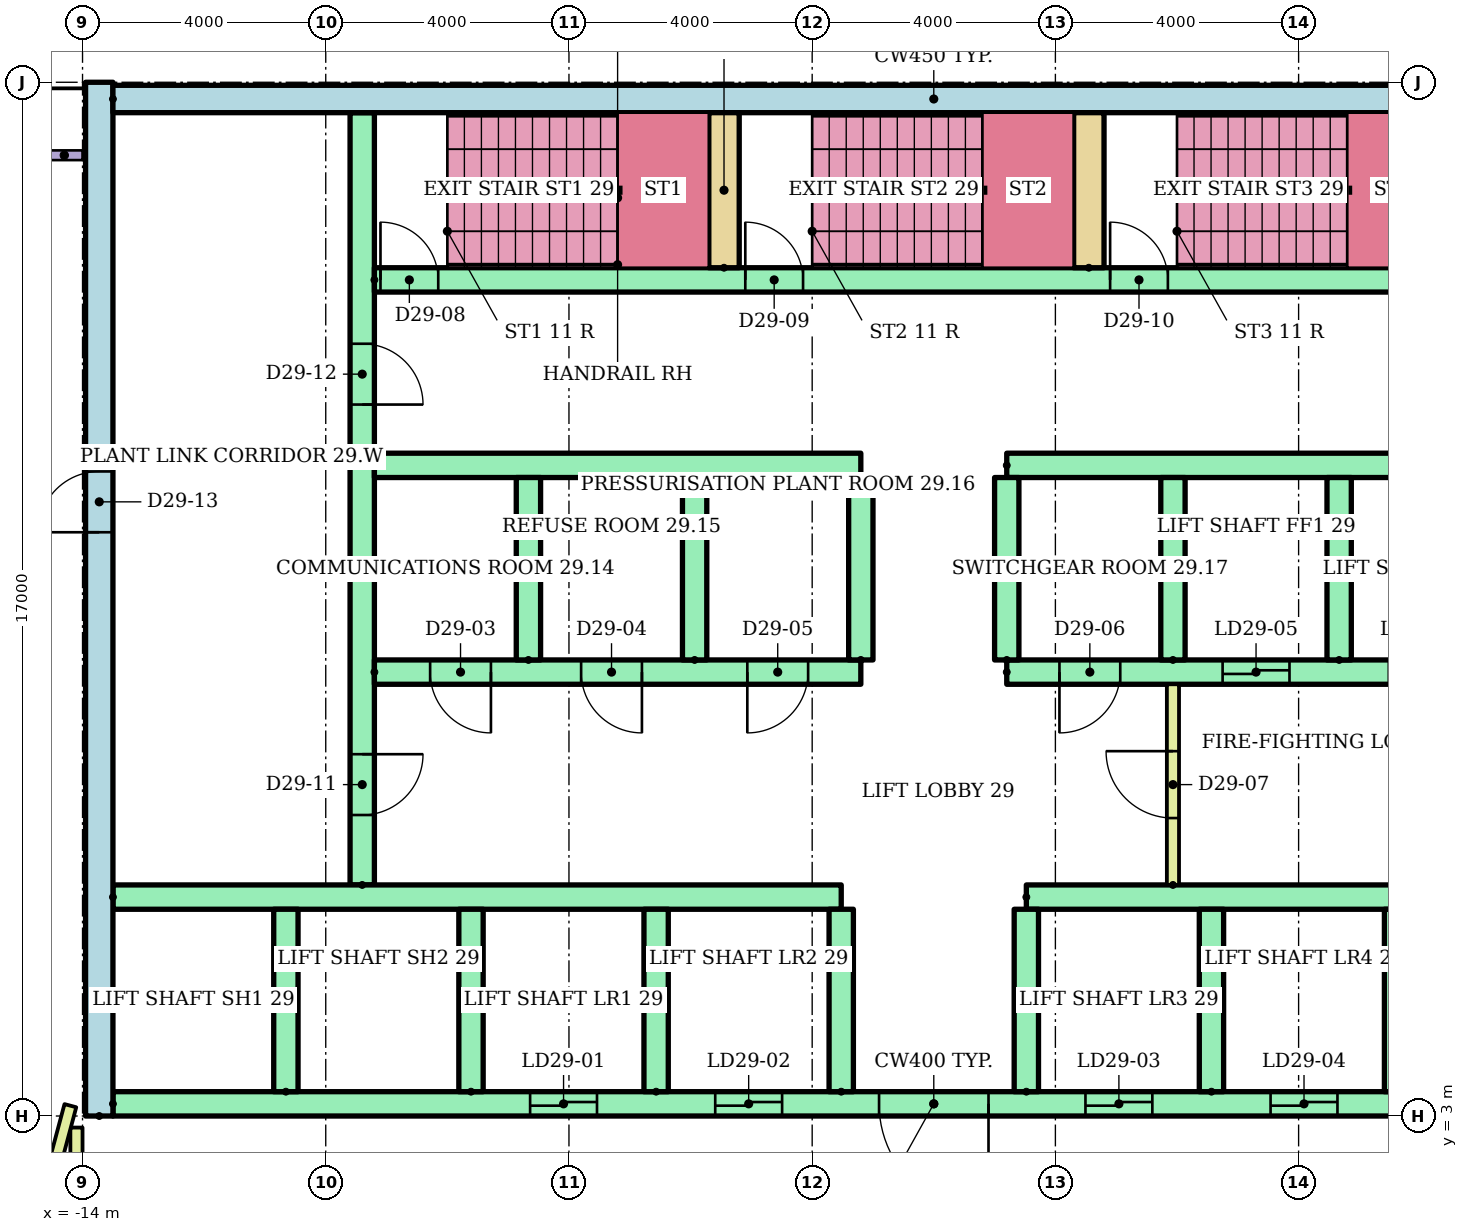
"""IFC4 building model, lengths in metres.
Left out: names, types, materials, properties, quantities, classifications, styles, units other than length and angle.
Written with IfcOpenShell. Run it as: python <this file> out.ifc"""

import sys

from ifc_helpers import new_model, si_unit, direction, frame, frame_2d, origin, place, context, subcontext, project, spatial, rectangle, extrude, element, fill, save


model = new_model("IFC4")
c1 = context("Model", 3, precision=1e-05, world=origin(), true_north=direction((0.0, 1.0)))
c2 = subcontext(c1, "Body", "Model", "MODEL_VIEW")
j1 = project(units=[si_unit("LENGTHUNIT", "METRE"), si_unit("PLANEANGLEUNIT", "RADIAN")], contexts=[c1])
p1 = place(None, origin())
s1 = spatial("IfcSite", under=j1, at=p1, CompositionType="ELEMENT")
p2 = place(p1, origin())
s2 = spatial("IfcBuilding", under=s1, at=p2, CompositionType="ELEMENT")
p3 = place(p2, frame((0.0, 0.0, 115.9)))
s3 = spatial("IfcBuildingStorey", under=s2, at=p3, CompositionType="ELEMENT", Elevation=115.9)
p4 = place(p3, frame((-13.725, 3.0, 0.0), z_axis=(0.0, 0.0, 1.0), x_axis=(0.0, 1.0, 0.0)))
e1 = element("IfcWall", 1, at=p4, inside=s3, PredefinedType="SHEAR", context=c2, shape_type="SweptSolid", body=[
    extrude(rectangle(XDim=17.0, YDim=0.45, at=frame_2d((8.5, 0.0))), origin(), (0.0, 0.0, 1.0), 3.62),
])
p5 = place(p4, frame((9.6, 0.0, 0.0)))
e2 = element("IfcOpeningElement", 2, at=p5, cuts=e1, PredefinedType="OPENING", context=c2, shape_type="SweptSolid", body=[
    extrude(rectangle(XDim=1.0, YDim=2.1, at=frame_2d((0.5, 1.05))), frame((0.0, 0.235, 0.0), z_axis=(0.0, -1.0, 0.0), x_axis=(1.0, 0.0, 0.0)), (0.0, 0.0, 1.0), 0.47),
])
p6 = place(p3, frame((-13.5, 19.725, 0.0)))
e3 = element("IfcWall", 3, at=p6, inside=s3, PredefinedType="SHEAR", context=c2, shape_type="SweptSolid", body=[
    extrude(rectangle(XDim=27.0, YDim=0.45, at=frame_2d((13.5, 0.0))), origin(), (0.0, 0.0, 1.0), 3.62),
])
p7 = place(p3, frame((-9.4, 6.8, 0.0), z_axis=(0.0, 0.0, 1.0), x_axis=(0.0, 1.0, 0.0)))
e4 = element("IfcWall", 4, at=p7, inside=s3, PredefinedType="SHEAR", context=c2, shape_type="SweptSolid", body=[
    extrude(rectangle(XDim=12.7, YDim=0.4, at=frame_2d((6.35, 0.0))), origin(), (0.0, 0.0, 1.0), 3.62),
])
p8 = place(p7, frame((1.15, 0.0, 0.0)))
e5 = element("IfcOpeningElement", 5, at=p8, cuts=e4, PredefinedType="OPENING", context=c2, shape_type="SweptSolid", body=[
    extrude(rectangle(XDim=1.0, YDim=2.1, at=frame_2d((0.5, 1.05))), frame((0.0, 0.21, 0.0), z_axis=(0.0, -1.0, 0.0), x_axis=(1.0, 0.0, 0.0)), (0.0, 0.0, 1.0), 0.42),
])
p9 = place(p7, frame((7.9, 0.0, 0.0)))
e6 = element("IfcOpeningElement", 6, at=p9, cuts=e4, PredefinedType="OPENING", context=c2, shape_type="SweptSolid", body=[
    extrude(rectangle(XDim=1.0, YDim=2.1, at=frame_2d((0.5, 1.05))), frame((0.0, 0.21, 0.0), z_axis=(0.0, -1.0, 0.0), x_axis=(1.0, 0.0, 0.0)), (0.0, 0.0, 1.0), 0.42),
])
p10 = place(p3, frame((-13.5, 3.2, 0.0)))
e7 = element("IfcWall", 7, at=p10, inside=s3, PredefinedType="SHEAR", context=c2, shape_type="SweptSolid", body=[
    extrude(rectangle(XDim=27.0, YDim=0.4, at=frame_2d((13.5, 0.0))), origin(), (0.0, 0.0, 1.0), 3.62),
])
p11 = place(p10, frame((6.861, 0.0, 0.0)))
e8 = element("IfcOpeningElement", 8, at=p11, cuts=e7, PredefinedType="OPENING", context=c2, shape_type="SweptSolid", body=[
    extrude(rectangle(XDim=1.1, YDim=2.1, at=frame_2d((0.55, 1.05))), frame((0.0, 0.21, 0.0), z_axis=(0.0, -1.0, 0.0), x_axis=(1.0, 0.0, 0.0)), (0.0, 0.0, 1.0), 0.42),
])
p12 = place(p10, frame((9.906, 0.0, 0.0)))
e9 = element("IfcOpeningElement", 9, at=p12, cuts=e7, PredefinedType="OPENING", context=c2, shape_type="SweptSolid", body=[
    extrude(rectangle(XDim=1.1, YDim=2.1, at=frame_2d((0.55, 1.05))), frame((0.0, 0.21, 0.0), z_axis=(0.0, -1.0, 0.0), x_axis=(1.0, 0.0, 0.0)), (0.0, 0.0, 1.0), 0.42),
])
p13 = place(p10, frame((15.994, 0.0, 0.0)))
e10 = element("IfcOpeningElement", 10, at=p13, cuts=e7, PredefinedType="OPENING", context=c2, shape_type="SweptSolid", body=[
    extrude(rectangle(XDim=1.1, YDim=2.1, at=frame_2d((0.55, 1.05))), frame((0.0, 0.21, 0.0), z_axis=(0.0, -1.0, 0.0), x_axis=(1.0, 0.0, 0.0)), (0.0, 0.0, 1.0), 0.42),
])
p14 = place(p10, frame((19.039, 0.0, 0.0)))
e11 = element("IfcOpeningElement", 11, at=p14, cuts=e7, PredefinedType="OPENING", context=c2, shape_type="SweptSolid", body=[
    extrude(rectangle(XDim=1.1, YDim=2.1, at=frame_2d((0.55, 1.05))), frame((0.0, 0.21, 0.0), z_axis=(0.0, -1.0, 0.0), x_axis=(1.0, 0.0, 0.0)), (0.0, 0.0, 1.0), 0.42),
])
p15 = place(p10, frame((12.6, 0.0, 0.0)))
e12 = element("IfcOpeningElement", 12, at=p15, cuts=e7, PredefinedType="OPENING", context=c2, shape_type="SweptSolid", body=[
    extrude(rectangle(XDim=1.8, YDim=2.1, at=frame_2d((0.9, 1.05))), frame((0.0, 0.21, 0.0), z_axis=(0.0, -1.0, 0.0), x_axis=(1.0, 0.0, 0.0)), (0.0, 0.0, 1.0), 0.42),
])
p16 = place(p3, frame((-13.5, 6.6, 0.0)))
e13 = element("IfcWall", 13, at=p16, inside=s3, PredefinedType="SHEAR", context=c2, shape_type="SweptSolid", body=[
    extrude(rectangle(XDim=11.978, YDim=0.4, at=frame_2d((5.989, 0.0))), origin(), (0.0, 0.0, 1.0), 3.62),
])
p17 = place(p3, frame((1.522, 6.6, 0.0)))
e14 = element("IfcWall", 14, at=p17, inside=s3, PredefinedType="SHEAR", context=c2, shape_type="SweptSolid", body=[
    extrude(rectangle(XDim=8.078, YDim=0.4, at=frame_2d((4.039, 0.0))), origin(), (0.0, 0.0, 1.0), 3.62),
])
for number, where, z_axis, x_axis in (
    (15, (-10.656, 3.4, 0.0), (0.0, 0.0, 1.0), (0.0, 1.0, 0.0)),
    (16, (-7.611, 3.4, 0.0), (0.0, 0.0, 1.0), (0.0, 1.0, 0.0)),
    (17, (-4.567, 3.4, 0.0), (0.0, 0.0, 1.0), (0.0, 1.0, 0.0)),
    (18, (-1.522, 3.4, 0.0), (0.0, 0.0, 1.0), (0.0, 1.0, 0.0)),
    (19, (1.522, 3.4, 0.0), (0.0, 0.0, 1.0), (0.0, 1.0, 0.0)),
    (20, (4.567, 3.4, 0.0), (0.0, 0.0, 1.0), (0.0, 1.0, 0.0)),
    (21, (7.611, 3.4, 0.0), (0.0, 0.0, 1.0), (0.0, 1.0, 0.0)),
):
    element("IfcWall", number, at=place(p3, frame(where, z_axis=z_axis, x_axis=x_axis)), inside=s3, PredefinedType="SHEAR", context=c2, shape_type="SweptSolid", body=[
        extrude(rectangle(XDim=3.0, YDim=0.4, at=frame_2d((1.5, 0.0))), origin(), (0.0, 0.0, 1.0), 3.62),
    ])
p18 = place(p3, frame((-9.2, 10.3, 0.0)))
e22 = element("IfcWall", 22, at=p18, inside=s3, PredefinedType="SHEAR", context=c2, shape_type="SweptSolid", body=[
    extrude(rectangle(XDim=8.0, YDim=0.4, at=frame_2d((4.0, 0.0))), origin(), (0.0, 0.0, 1.0), 3.62),
])
p19 = place(p18, frame((0.917, 0.0, 0.0)))
e23 = element("IfcOpeningElement", 23, at=p19, cuts=e22, PredefinedType="OPENING", context=c2, shape_type="SweptSolid", body=[
    extrude(rectangle(XDim=1.0, YDim=2.1, at=frame_2d((0.5, 1.05))), frame((0.0, 0.21, 0.0), z_axis=(0.0, -1.0, 0.0), x_axis=(1.0, 0.0, 0.0)), (0.0, 0.0, 1.0), 0.42),
])
p20 = place(p18, frame((3.4, 0.0, 0.0)))
e24 = element("IfcOpeningElement", 24, at=p20, cuts=e22, PredefinedType="OPENING", context=c2, shape_type="SweptSolid", body=[
    extrude(rectangle(XDim=1.0, YDim=2.1, at=frame_2d((0.5, 1.05))), frame((0.0, 0.21, 0.0), z_axis=(0.0, -1.0, 0.0), x_axis=(1.0, 0.0, 0.0)), (0.0, 0.0, 1.0), 0.42),
])
p21 = place(p18, frame((6.133, 0.0, 0.0)))
e25 = element("IfcOpeningElement", 25, at=p21, cuts=e22, PredefinedType="OPENING", context=c2, shape_type="SweptSolid", body=[
    extrude(rectangle(XDim=1.0, YDim=2.1, at=frame_2d((0.5, 1.05))), frame((0.0, 0.21, 0.0), z_axis=(0.0, -1.0, 0.0), x_axis=(1.0, 0.0, 0.0)), (0.0, 0.0, 1.0), 0.42),
])
p22 = place(p3, frame((-9.2, 13.7, 0.0)))
e26 = element("IfcWall", 26, at=p22, inside=s3, PredefinedType="SHEAR", context=c2, shape_type="SweptSolid", body=[
    extrude(rectangle(XDim=8.0, YDim=0.4, at=frame_2d((4.0, 0.0))), origin(), (0.0, 0.0, 1.0), 3.62),
])
p23 = place(p3, frame((1.2, 10.3, 0.0)))
e27 = element("IfcWall", 27, at=p23, inside=s3, PredefinedType="SHEAR", context=c2, shape_type="SweptSolid", body=[
    extrude(rectangle(XDim=8.0, YDim=0.4, at=frame_2d((4.0, 0.0))), origin(), (0.0, 0.0, 1.0), 3.62),
])
p24 = place(p23, frame((3.55, 0.0, 0.0)))
e28 = element("IfcOpeningElement", 28, at=p24, cuts=e27, PredefinedType="OPENING", context=c2, shape_type="SweptSolid", body=[
    extrude(rectangle(XDim=1.1, YDim=2.1, at=frame_2d((0.55, 1.05))), frame((0.0, 0.21, 0.0), z_axis=(0.0, -1.0, 0.0), x_axis=(1.0, 0.0, 0.0)), (0.0, 0.0, 1.0), 0.42),
])
p25 = place(p23, frame((6.283, 0.0, 0.0)))
e29 = element("IfcOpeningElement", 29, at=p25, cuts=e27, PredefinedType="OPENING", context=c2, shape_type="SweptSolid", body=[
    extrude(rectangle(XDim=1.1, YDim=2.1, at=frame_2d((0.55, 1.05))), frame((0.0, 0.21, 0.0), z_axis=(0.0, -1.0, 0.0), x_axis=(1.0, 0.0, 0.0)), (0.0, 0.0, 1.0), 0.42),
])
p26 = place(p23, frame((0.867, 0.0, 0.0)))
e30 = element("IfcOpeningElement", 30, at=p26, cuts=e27, PredefinedType="OPENING", context=c2, shape_type="SweptSolid", body=[
    extrude(rectangle(XDim=1.0, YDim=2.1, at=frame_2d((0.5, 1.05))), frame((0.0, 0.21, 0.0), z_axis=(0.0, -1.0, 0.0), x_axis=(1.0, 0.0, 0.0)), (0.0, 0.0, 1.0), 0.42),
])
p27 = place(p3, frame((1.2, 13.7, 0.0)))
e31 = element("IfcWall", 31, at=p27, inside=s3, PredefinedType="SHEAR", context=c2, shape_type="SweptSolid", body=[
    extrude(rectangle(XDim=8.0, YDim=0.4, at=frame_2d((4.0, 0.0))), origin(), (0.0, 0.0, 1.0), 3.62),
])
for number, where, z_axis, x_axis in (
    (32, (-6.667, 10.5, 0.0), (0.0, 0.0, 1.0), (0.0, 1.0, 0.0)),
    (33, (-3.933, 10.5, 0.0), (0.0, 0.0, 1.0), (0.0, 1.0, 0.0)),
    (34, (-1.2, 10.5, 0.0), (0.0, 0.0, 1.0), (0.0, 1.0, 0.0)),
    (35, (1.2, 10.5, 0.0), (0.0, 0.0, 1.0), (0.0, 1.0, 0.0)),
    (36, (3.933, 10.5, 0.0), (0.0, 0.0, 1.0), (0.0, 1.0, 0.0)),
    (37, (6.667, 10.5, 0.0), (0.0, 0.0, 1.0), (0.0, 1.0, 0.0)),
):
    element("IfcWall", number, at=place(p3, frame(where, z_axis=z_axis, x_axis=x_axis)), inside=s3, PredefinedType="SHEAR", context=c2, shape_type="SweptSolid", body=[
        extrude(rectangle(XDim=3.0, YDim=0.4, at=frame_2d((1.5, 0.0))), origin(), (0.0, 0.0, 1.0), 3.62),
    ])
p28 = place(p3, frame((3.933, 6.8, 0.0), z_axis=(0.0, 0.0, 1.0), x_axis=(0.0, 1.0, 0.0)))
e38 = element("IfcWall", 38, at=p28, inside=s3, PredefinedType="PARTITIONING", context=c2, shape_type="SweptSolid", body=[
    extrude(rectangle(XDim=3.3, YDim=0.2, at=frame_2d((1.65, 0.0))), origin(), (0.0, 0.0, 1.0), 3.62),
])
p29 = place(p28, frame((1.1, 0.0, 0.0)))
e39 = element("IfcOpeningElement", 39, at=p29, cuts=e38, PredefinedType="OPENING", context=c2, shape_type="SweptSolid", body=[
    extrude(rectangle(XDim=1.1, YDim=2.1, at=frame_2d((0.55, 1.05))), frame((0.0, 0.11, 0.0), z_axis=(0.0, -1.0, 0.0), x_axis=(1.0, 0.0, 0.0)), (0.0, 0.0, 1.0), 0.22),
])
p30 = place(p3, frame((-9.2, 16.75, 0.0)))
e40 = element("IfcWall", 40, at=p30, inside=s3, PredefinedType="SHEAR", context=c2, shape_type="SweptSolid", body=[
    extrude(rectangle(XDim=18.4, YDim=0.4, at=frame_2d((9.2, 0.0))), origin(), (0.0, 0.0, 1.0), 3.62),
])
p31 = place(p30, frame((0.1, 0.0, 0.0)))
e41 = element("IfcOpeningElement", 41, at=p31, cuts=e40, PredefinedType="OPENING", context=c2, shape_type="SweptSolid", body=[
    extrude(rectangle(XDim=0.95, YDim=2.1, at=frame_2d((0.475, 1.05))), frame((0.0, 0.21, 0.0), z_axis=(0.0, -1.0, 0.0), x_axis=(1.0, 0.0, 0.0)), (0.0, 0.0, 1.0), 0.42),
])
p32 = place(p30, frame((6.1, 0.0, 0.0)))
e42 = element("IfcOpeningElement", 42, at=p32, cuts=e40, PredefinedType="OPENING", context=c2, shape_type="SweptSolid", body=[
    extrude(rectangle(XDim=0.95, YDim=2.1, at=frame_2d((0.475, 1.05))), frame((0.0, 0.21, 0.0), z_axis=(0.0, -1.0, 0.0), x_axis=(1.0, 0.0, 0.0)), (0.0, 0.0, 1.0), 0.42),
])
p33 = place(p30, frame((12.1, 0.0, 0.0)))
e43 = element("IfcOpeningElement", 43, at=p33, cuts=e40, PredefinedType="OPENING", context=c2, shape_type="SweptSolid", body=[
    extrude(rectangle(XDim=0.95, YDim=2.1, at=frame_2d((0.475, 1.05))), frame((0.0, 0.21, 0.0), z_axis=(0.0, -1.0, 0.0), x_axis=(1.0, 0.0, 0.0)), (0.0, 0.0, 1.0), 0.42),
])
for number, where, z_axis, x_axis in (
    (44, (-3.45, 16.95, 0.0), (0.0, 0.0, 1.0), (0.0, 1.0, 0.0)),
    (45, (2.55, 16.95, 0.0), (0.0, 0.0, 1.0), (0.0, 1.0, 0.0)),
):
    element("IfcWall", number, at=place(p3, frame(where, z_axis=z_axis, x_axis=x_axis)), inside=s3, PredefinedType="SHEAR", context=c2, shape_type="SweptSolid", body=[
        extrude(rectangle(XDim=2.55, YDim=0.5, at=frame_2d((1.275, 0.0))), origin(), (0.0, 0.0, 1.0), 3.62),
    ])
p34 = place(p3, frame((-14.1, 1.5, 0.0), z_axis=(0.0, 0.0, 1.0), x_axis=(0.0, 1.0, 0.0)))
e46 = element("IfcWall", 46, at=p34, inside=s3, PredefinedType="PARTITIONING", context=c2, shape_type="SweptSolid", body=[
    extrude(rectangle(XDim=1.31, YDim=0.2, at=frame_2d((0.655, 0.0))), origin(), (0.0, 0.0, 1.0), 3.62),
])
p35 = place(p3, frame((-14.615, 1.619, 0.0), z_axis=(0.0, 0.0, 1.0), x_axis=(0.258429414785, 0.966030143201, 0.0)))
e47 = element("IfcWall", 47, at=p35, inside=s3, PredefinedType="PARTITIONING", context=c2, shape_type="SweptSolid", body=[
    extrude(rectangle(XDim=1.605, YDim=0.2, at=frame_2d((0.802, 0.0))), origin(), (0.0, 0.0, 1.0), 3.62),
])
p36 = place(p11, origin())
e48 = element("IfcDoor", 48, at=p36, inside=s3, OperationType="SLIDING_TO_LEFT", PredefinedType="DOOR", context=c2, shape_type="SweptSolid", body=[
    extrude(rectangle(XDim=1.1, YDim=2.1, at=frame_2d((0.55, 1.05))), frame((0.0, 0.025, 0.0), z_axis=(0.0, -1.0, 0.0), x_axis=(1.0, 0.0, 0.0)), (0.0, 0.0, 1.0), 0.05),
])
fill(e8, e48)
p37 = place(p12, origin())
e49 = element("IfcDoor", 49, at=p37, inside=s3, OperationType="SLIDING_TO_LEFT", PredefinedType="DOOR", context=c2, shape_type="SweptSolid", body=[
    extrude(rectangle(XDim=1.1, YDim=2.1, at=frame_2d((0.55, 1.05))), frame((0.0, 0.025, 0.0), z_axis=(0.0, -1.0, 0.0), x_axis=(1.0, 0.0, 0.0)), (0.0, 0.0, 1.0), 0.05),
])
fill(e9, e49)
p38 = place(p13, origin())
e50 = element("IfcDoor", 50, at=p38, inside=s3, OperationType="SLIDING_TO_LEFT", PredefinedType="DOOR", context=c2, shape_type="SweptSolid", body=[
    extrude(rectangle(XDim=1.1, YDim=2.1, at=frame_2d((0.55, 1.05))), frame((0.0, 0.025, 0.0), z_axis=(0.0, -1.0, 0.0), x_axis=(1.0, 0.0, 0.0)), (0.0, 0.0, 1.0), 0.05),
])
fill(e10, e50)
p39 = place(p14, origin())
e51 = element("IfcDoor", 51, at=p39, inside=s3, OperationType="SLIDING_TO_LEFT", PredefinedType="DOOR", context=c2, shape_type="SweptSolid", body=[
    extrude(rectangle(XDim=1.1, YDim=2.1, at=frame_2d((0.55, 1.05))), frame((0.0, 0.025, 0.0), z_axis=(0.0, -1.0, 0.0), x_axis=(1.0, 0.0, 0.0)), (0.0, 0.0, 1.0), 0.05),
])
fill(e11, e51)
p40 = place(p15, frame((1.8, 0.0, 0.0), z_axis=(0.0, 0.0, 1.0), x_axis=(-1.0, 0.0, 0.0)))
e52 = element("IfcDoor", 52, at=p40, inside=s3, OperationType="DOUBLE_DOOR_SINGLE_SWING", PredefinedType="DOOR", context=c2, shape_type="SweptSolid", body=[
    extrude(rectangle(XDim=1.8, YDim=2.1, at=frame_2d((0.9, 1.05))), frame((0.0, 0.025, 0.0), z_axis=(0.0, -1.0, 0.0), x_axis=(1.0, 0.0, 0.0)), (0.0, 0.0, 1.0), 0.05),
])
fill(e12, e52)
p41 = place(p24, origin())
e53 = element("IfcDoor", 53, at=p41, inside=s3, OperationType="SLIDING_TO_LEFT", PredefinedType="DOOR", context=c2, shape_type="SweptSolid", body=[
    extrude(rectangle(XDim=1.1, YDim=2.1, at=frame_2d((0.55, 1.05))), frame((0.0, 0.025, 0.0), z_axis=(0.0, -1.0, 0.0), x_axis=(1.0, 0.0, 0.0)), (0.0, 0.0, 1.0), 0.05),
])
fill(e28, e53)
p42 = place(p19, frame((1.0, 0.0, 0.0), z_axis=(0.0, 0.0, 1.0), x_axis=(-1.0, 0.0, 0.0)))
e54 = element("IfcDoor", 54, at=p42, inside=s3, OperationType="SINGLE_SWING_RIGHT", PredefinedType="DOOR", context=c2, shape_type="SweptSolid", body=[
    extrude(rectangle(XDim=1.0, YDim=2.1, at=frame_2d((0.5, 1.05))), frame((0.0, 0.025, 0.0), z_axis=(0.0, -1.0, 0.0), x_axis=(1.0, 0.0, 0.0)), (0.0, 0.0, 1.0), 0.05),
])
fill(e23, e54)
p43 = place(p20, frame((1.0, 0.0, 0.0), z_axis=(0.0, 0.0, 1.0), x_axis=(-1.0, 0.0, 0.0)))
e55 = element("IfcDoor", 55, at=p43, inside=s3, OperationType="SINGLE_SWING_RIGHT", PredefinedType="DOOR", context=c2, shape_type="SweptSolid", body=[
    extrude(rectangle(XDim=1.0, YDim=2.1, at=frame_2d((0.5, 1.05))), frame((0.0, 0.025, 0.0), z_axis=(0.0, -1.0, 0.0), x_axis=(1.0, 0.0, 0.0)), (0.0, 0.0, 1.0), 0.05),
])
fill(e24, e55)
p44 = place(p21, frame((1.0, 0.0, 0.0), z_axis=(0.0, 0.0, 1.0), x_axis=(-1.0, 0.0, 0.0)))
e56 = element("IfcDoor", 56, at=p44, inside=s3, OperationType="SINGLE_SWING_LEFT", PredefinedType="DOOR", context=c2, shape_type="SweptSolid", body=[
    extrude(rectangle(XDim=1.0, YDim=2.1, at=frame_2d((0.5, 1.05))), frame((0.0, 0.025, 0.0), z_axis=(0.0, -1.0, 0.0), x_axis=(1.0, 0.0, 0.0)), (0.0, 0.0, 1.0), 0.05),
])
fill(e25, e56)
p45 = place(p26, frame((1.0, 0.0, 0.0), z_axis=(0.0, 0.0, 1.0), x_axis=(-1.0, 0.0, 0.0)))
e57 = element("IfcDoor", 57, at=p45, inside=s3, OperationType="SINGLE_SWING_LEFT", PredefinedType="DOOR", context=c2, shape_type="SweptSolid", body=[
    extrude(rectangle(XDim=1.0, YDim=2.1, at=frame_2d((0.5, 1.05))), frame((0.0, 0.025, 0.0), z_axis=(0.0, -1.0, 0.0), x_axis=(1.0, 0.0, 0.0)), (0.0, 0.0, 1.0), 0.05),
])
fill(e30, e57)
p46 = place(p29, origin())
e58 = element("IfcDoor", 58, at=p46, inside=s3, OperationType="SINGLE_SWING_RIGHT", PredefinedType="DOOR", context=c2, shape_type="SweptSolid", body=[
    extrude(rectangle(XDim=1.1, YDim=2.1, at=frame_2d((0.55, 1.05))), frame((0.0, 0.025, 0.0), z_axis=(0.0, -1.0, 0.0), x_axis=(1.0, 0.0, 0.0)), (0.0, 0.0, 1.0), 0.05),
])
fill(e39, e58)
p47 = place(p31, origin())
e59 = element("IfcDoor", 59, at=p47, inside=s3, OperationType="SINGLE_SWING_LEFT", PredefinedType="DOOR", context=c2, shape_type="SweptSolid", body=[
    extrude(rectangle(XDim=0.95, YDim=2.1, at=frame_2d((0.475, 1.05))), frame((0.0, 0.025, 0.0), z_axis=(0.0, -1.0, 0.0), x_axis=(1.0, 0.0, 0.0)), (0.0, 0.0, 1.0), 0.05),
])
fill(e41, e59)
p48 = place(p32, origin())
e60 = element("IfcDoor", 60, at=p48, inside=s3, OperationType="SINGLE_SWING_LEFT", PredefinedType="DOOR", context=c2, shape_type="SweptSolid", body=[
    extrude(rectangle(XDim=0.95, YDim=2.1, at=frame_2d((0.475, 1.05))), frame((0.0, 0.025, 0.0), z_axis=(0.0, -1.0, 0.0), x_axis=(1.0, 0.0, 0.0)), (0.0, 0.0, 1.0), 0.05),
])
fill(e42, e60)
p49 = place(p33, origin())
e61 = element("IfcDoor", 61, at=p49, inside=s3, OperationType="SINGLE_SWING_LEFT", PredefinedType="DOOR", context=c2, shape_type="SweptSolid", body=[
    extrude(rectangle(XDim=0.95, YDim=2.1, at=frame_2d((0.475, 1.05))), frame((0.0, 0.025, 0.0), z_axis=(0.0, -1.0, 0.0), x_axis=(1.0, 0.0, 0.0)), (0.0, 0.0, 1.0), 0.05),
])
fill(e43, e61)
p50 = place(p8, frame((1.0, 0.0, 0.0), z_axis=(0.0, 0.0, 1.0), x_axis=(-1.0, 0.0, 0.0)))
e62 = element("IfcDoor", 62, at=p50, inside=s3, OperationType="SINGLE_SWING_RIGHT", PredefinedType="DOOR", context=c2, shape_type="SweptSolid", body=[
    extrude(rectangle(XDim=1.0, YDim=2.1, at=frame_2d((0.5, 1.05))), frame((0.0, 0.025, 0.0), z_axis=(0.0, -1.0, 0.0), x_axis=(1.0, 0.0, 0.0)), (0.0, 0.0, 1.0), 0.05),
])
fill(e5, e62)
p51 = place(p9, frame((1.0, 0.0, 0.0), z_axis=(0.0, 0.0, 1.0), x_axis=(-1.0, 0.0, 0.0)))
e63 = element("IfcDoor", 63, at=p51, inside=s3, OperationType="SINGLE_SWING_LEFT", PredefinedType="DOOR", context=c2, shape_type="SweptSolid", body=[
    extrude(rectangle(XDim=1.0, YDim=2.1, at=frame_2d((0.5, 1.05))), frame((0.0, 0.025, 0.0), z_axis=(0.0, -1.0, 0.0), x_axis=(1.0, 0.0, 0.0)), (0.0, 0.0, 1.0), 0.05),
])
fill(e6, e63)
p52 = place(p5, origin())
e64 = element("IfcDoor", 64, at=p52, inside=s3, OperationType="SINGLE_SWING_LEFT", PredefinedType="DOOR", context=c2, shape_type="SweptSolid", body=[
    extrude(rectangle(XDim=1.0, YDim=2.1, at=frame_2d((0.5, 1.05))), frame((0.0, 0.025, 0.0), z_axis=(0.0, -1.0, 0.0), x_axis=(1.0, 0.0, 0.0)), (0.0, 0.0, 1.0), 0.05),
])
fill(e2, e64)
save(model, sys.argv[1])
